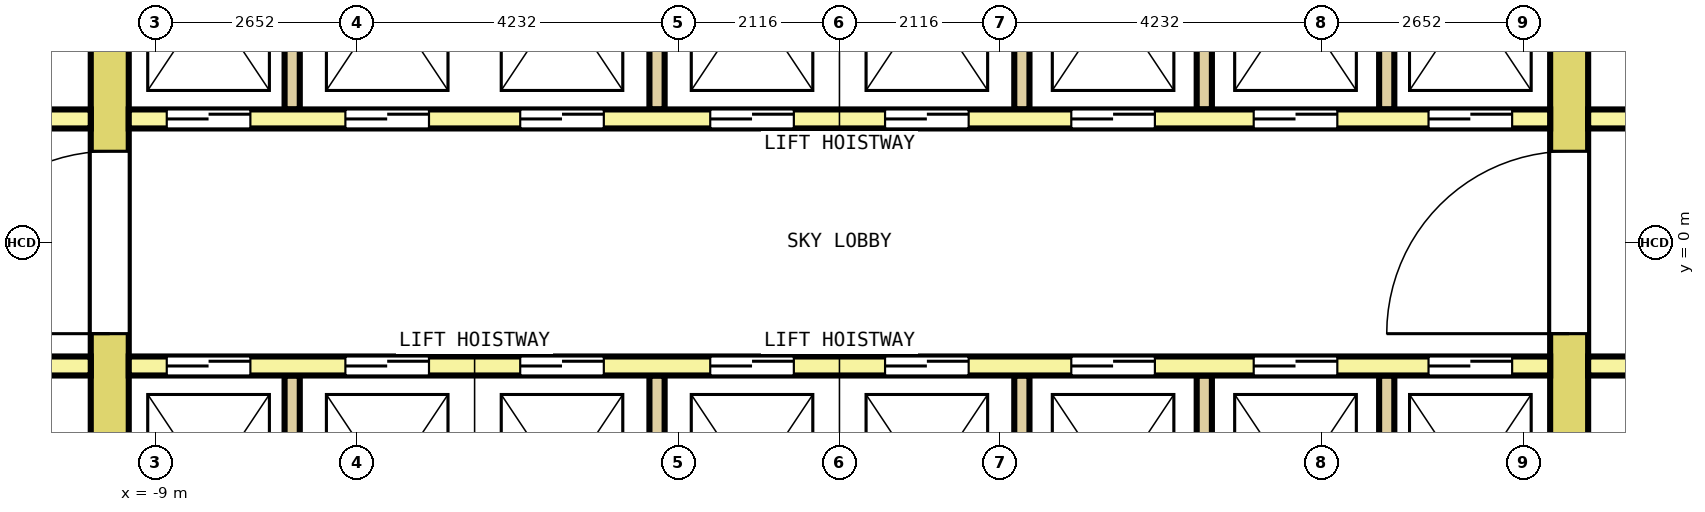
"""IFC4 building model, lengths in metres.
Left out: names, types, materials, properties, quantities, classifications, styles, units other than length and angle.
Written with IfcOpenShell. Run it as: python <this file> out.ifc"""

import sys

from ifc_helpers import new_model, si_unit, direction, frame, frame_2d, origin, place, context, subcontext, project, spatial, rectangle, extrude, element, fill, save


model = new_model("IFC4")
c1 = context("Model", 3, precision=1e-05, world=origin(), true_north=direction((0.0, 1.0)))
c2 = subcontext(c1, "Body", "Model", "MODEL_VIEW")
j1 = project(units=[si_unit("LENGTHUNIT", "METRE"), si_unit("PLANEANGLEUNIT", "RADIAN")], contexts=[c1])
p1 = place(None, origin())
s1 = spatial("IfcSite", under=j1, at=p1, CompositionType="ELEMENT")
p2 = place(p1, origin())
s2 = spatial("IfcBuilding", under=s1, at=p2, CompositionType="ELEMENT")
p3 = place(p2, frame((0.0, 0.0, 107.2)))
s3 = spatial("IfcBuildingStorey", under=s2, at=p3, CompositionType="ELEMENT", Elevation=107.2)
p4 = place(p3, frame((-9.6, -7.7, 0.0), z_axis=(0.0, 0.0, 1.0), x_axis=(0.0, 1.0, 0.0)))
e1 = element("IfcWall", 1, at=p4, inside=s3, PredefinedType="SHEAR", context=c2, shape_type="SweptSolid", body=[
    extrude(rectangle(XDim=15.4, YDim=0.5, at=frame_2d((7.7, 0.0))), origin(), (0.0, 0.0, 1.0), 5.7),
])
p5 = place(p4, frame((6.5, 0.0, 0.0)))
e2 = element("IfcOpeningElement", 2, at=p5, cuts=e1, PredefinedType="OPENING", context=c2, shape_type="SweptSolid", body=[
    extrude(rectangle(XDim=2.4, YDim=2.1, at=frame_2d((1.2, 1.05))), frame((0.0, 0.26, 0.0), z_axis=(0.0, -1.0, 0.0), x_axis=(1.0, 0.0, 0.0)), (0.0, 0.0, 1.0), 0.52),
])
p6 = place(p4, frame((13.4, 0.0, 0.0)))
e3 = element("IfcOpeningElement", 3, at=p6, cuts=e1, PredefinedType="OPENING", context=c2, shape_type="SweptSolid", body=[
    extrude(rectangle(XDim=1.2, YDim=2.1, at=frame_2d((0.6, 1.05))), frame((0.0, 0.26, 0.0), z_axis=(0.0, -1.0, 0.0), x_axis=(1.0, 0.0, 0.0)), (0.0, 0.0, 1.0), 0.52),
])
p7 = place(p4, frame((0.8, 0.0, 0.0)))
e4 = element("IfcOpeningElement", 4, at=p7, cuts=e1, PredefinedType="OPENING", context=c2, shape_type="SweptSolid", body=[
    extrude(rectangle(XDim=1.2, YDim=2.1, at=frame_2d((0.6, 1.05))), frame((0.0, 0.26, 0.0), z_axis=(0.0, -1.0, 0.0), x_axis=(1.0, 0.0, 0.0)), (0.0, 0.0, 1.0), 0.52),
])
p8 = place(p3, frame((9.6, -7.7, 0.0), z_axis=(0.0, 0.0, 1.0), x_axis=(0.0, 1.0, 0.0)))
e5 = element("IfcWall", 5, at=p8, inside=s3, PredefinedType="SHEAR", context=c2, shape_type="SweptSolid", body=[
    extrude(rectangle(XDim=15.4, YDim=0.5, at=frame_2d((7.7, 0.0))), origin(), (0.0, 0.0, 1.0), 5.7),
])
p9 = place(p8, frame((6.5, 0.0, 0.0)))
e6 = element("IfcOpeningElement", 6, at=p9, cuts=e5, PredefinedType="OPENING", context=c2, shape_type="SweptSolid", body=[
    extrude(rectangle(XDim=2.4, YDim=2.1, at=frame_2d((1.2, 1.05))), frame((0.0, 0.26, 0.0), z_axis=(0.0, -1.0, 0.0), x_axis=(1.0, 0.0, 0.0)), (0.0, 0.0, 1.0), 0.52),
])
p10 = place(p8, frame((13.4, 0.0, 0.0)))
e7 = element("IfcOpeningElement", 7, at=p10, cuts=e5, PredefinedType="OPENING", context=c2, shape_type="SweptSolid", body=[
    extrude(rectangle(XDim=1.2, YDim=2.1, at=frame_2d((0.6, 1.05))), frame((0.0, 0.26, 0.0), z_axis=(0.0, -1.0, 0.0), x_axis=(1.0, 0.0, 0.0)), (0.0, 0.0, 1.0), 0.52),
])
p11 = place(p8, frame((0.9, 0.0, 0.0)))
e8 = element("IfcOpeningElement", 8, at=p11, cuts=e5, PredefinedType="OPENING", context=c2, shape_type="SweptSolid", body=[
    extrude(rectangle(XDim=1.0, YDim=2.1, at=frame_2d((0.5, 1.05))), frame((0.0, 0.26, 0.0), z_axis=(0.0, -1.0, 0.0), x_axis=(1.0, 0.0, 0.0)), (0.0, 0.0, 1.0), 0.52),
])
p12 = place(p3, frame((-12.8, 1.625, 0.0), z_axis=(0.0, 0.0, 1.0), x_axis=(1.0, 0.0, 0.0)))
e9 = element("IfcWall", 9, at=p12, inside=s3, PredefinedType="SOLIDWALL", context=c2, shape_type="SweptSolid", body=[
    extrude(rectangle(XDim=2.95, YDim=0.25, at=frame_2d((1.475, 0.0))), origin(), (0.0, 0.0, 1.0), 5.7),
])
p13 = place(p12, frame((0.925, 0.0, 0.0)))
e10 = element("IfcOpeningElement", 10, at=p13, cuts=e9, PredefinedType="OPENING", context=c2, shape_type="SweptSolid", body=[
    extrude(rectangle(XDim=1.1, YDim=2.1, at=frame_2d((0.55, 1.05))), frame((0.0, 0.135, 0.0), z_axis=(0.0, -1.0, 0.0), x_axis=(1.0, 0.0, 0.0)), (0.0, 0.0, 1.0), 0.27),
])
p14 = place(p3, frame((-9.35, 1.625, 0.0), z_axis=(0.0, 0.0, 1.0), x_axis=(1.0, 0.0, 0.0)))
e11 = element("IfcWall", 11, at=p14, inside=s3, PredefinedType="SOLIDWALL", context=c2, shape_type="SweptSolid", body=[
    extrude(rectangle(XDim=18.7, YDim=0.25, at=frame_2d((9.35, 0.0))), origin(), (0.0, 0.0, 1.0), 5.7),
])
p15 = place(p14, frame((0.5, 0.0, 0.0)))
e12 = element("IfcOpeningElement", 12, at=p15, cuts=e11, PredefinedType="OPENING", context=c2, shape_type="SweptSolid", body=[
    extrude(rectangle(XDim=1.1, YDim=2.1, at=frame_2d((0.55, 1.05))), frame((0.0, 0.135, 0.0), z_axis=(0.0, -1.0, 0.0), x_axis=(1.0, 0.0, 0.0)), (0.0, 0.0, 1.0), 0.27),
])
p16 = place(p14, frame((2.85, 0.0, 0.0)))
e13 = element("IfcOpeningElement", 13, at=p16, cuts=e11, PredefinedType="OPENING", context=c2, shape_type="SweptSolid", body=[
    extrude(rectangle(XDim=1.1, YDim=2.1, at=frame_2d((0.55, 1.05))), frame((0.0, 0.135, 0.0), z_axis=(0.0, -1.0, 0.0), x_axis=(1.0, 0.0, 0.0)), (0.0, 0.0, 1.0), 0.27),
])
p17 = place(p14, frame((5.15, 0.0, 0.0)))
e14 = element("IfcOpeningElement", 14, at=p17, cuts=e11, PredefinedType="OPENING", context=c2, shape_type="SweptSolid", body=[
    extrude(rectangle(XDim=1.1, YDim=2.1, at=frame_2d((0.55, 1.05))), frame((0.0, 0.135, 0.0), z_axis=(0.0, -1.0, 0.0), x_axis=(1.0, 0.0, 0.0)), (0.0, 0.0, 1.0), 0.27),
])
p18 = place(p14, frame((7.65, 0.0, 0.0)))
e15 = element("IfcOpeningElement", 15, at=p18, cuts=e11, PredefinedType="OPENING", context=c2, shape_type="SweptSolid", body=[
    extrude(rectangle(XDim=1.1, YDim=2.1, at=frame_2d((0.55, 1.05))), frame((0.0, 0.135, 0.0), z_axis=(0.0, -1.0, 0.0), x_axis=(1.0, 0.0, 0.0)), (0.0, 0.0, 1.0), 0.27),
])
p19 = place(p14, frame((9.95, 0.0, 0.0)))
e16 = element("IfcOpeningElement", 16, at=p19, cuts=e11, PredefinedType="OPENING", context=c2, shape_type="SweptSolid", body=[
    extrude(rectangle(XDim=1.1, YDim=2.1, at=frame_2d((0.55, 1.05))), frame((0.0, 0.135, 0.0), z_axis=(0.0, -1.0, 0.0), x_axis=(1.0, 0.0, 0.0)), (0.0, 0.0, 1.0), 0.27),
])
p20 = place(p14, frame((12.4, 0.0, 0.0)))
e17 = element("IfcOpeningElement", 17, at=p20, cuts=e11, PredefinedType="OPENING", context=c2, shape_type="SweptSolid", body=[
    extrude(rectangle(XDim=1.1, YDim=2.1, at=frame_2d((0.55, 1.05))), frame((0.0, 0.135, 0.0), z_axis=(0.0, -1.0, 0.0), x_axis=(1.0, 0.0, 0.0)), (0.0, 0.0, 1.0), 0.27),
])
p21 = place(p14, frame((14.8, 0.0, 0.0)))
e18 = element("IfcOpeningElement", 18, at=p21, cuts=e11, PredefinedType="OPENING", context=c2, shape_type="SweptSolid", body=[
    extrude(rectangle(XDim=1.1, YDim=2.1, at=frame_2d((0.55, 1.05))), frame((0.0, 0.135, 0.0), z_axis=(0.0, -1.0, 0.0), x_axis=(1.0, 0.0, 0.0)), (0.0, 0.0, 1.0), 0.27),
])
p22 = place(p14, frame((17.1, 0.0, 0.0)))
e19 = element("IfcOpeningElement", 19, at=p22, cuts=e11, PredefinedType="OPENING", context=c2, shape_type="SweptSolid", body=[
    extrude(rectangle(XDim=1.1, YDim=2.1, at=frame_2d((0.55, 1.05))), frame((0.0, 0.135, 0.0), z_axis=(0.0, -1.0, 0.0), x_axis=(1.0, 0.0, 0.0)), (0.0, 0.0, 1.0), 0.27),
])
p23 = place(p3, frame((9.85, 1.625, 0.0), z_axis=(0.0, 0.0, 1.0), x_axis=(1.0, 0.0, 0.0)))
e20 = element("IfcWall", 20, at=p23, inside=s3, PredefinedType="SOLIDWALL", context=c2, shape_type="SweptSolid", body=[
    extrude(rectangle(XDim=2.95, YDim=0.25, at=frame_2d((1.475, 0.0))), origin(), (0.0, 0.0, 1.0), 5.7),
])
p24 = place(p23, frame((0.925, 0.0, 0.0)))
e21 = element("IfcOpeningElement", 21, at=p24, cuts=e20, PredefinedType="OPENING", context=c2, shape_type="SweptSolid", body=[
    extrude(rectangle(XDim=1.1, YDim=2.1, at=frame_2d((0.55, 1.05))), frame((0.0, 0.135, 0.0), z_axis=(0.0, -1.0, 0.0), x_axis=(1.0, 0.0, 0.0)), (0.0, 0.0, 1.0), 0.27),
])
for number, where, z_axis, x_axis in (
    (22, (-7.2, 1.75, 0.0), (0.0, 0.0, 1.0), (0.0, 1.0, 0.0)),
    (23, (-2.4, 1.75, 0.0), (0.0, 0.0, 1.0), (0.0, 1.0, 0.0)),
    (24, (2.4, 1.75, 0.0), (0.0, 0.0, 1.0), (0.0, 1.0, 0.0)),
    (25, (4.8, 1.75, 0.0), (0.0, 0.0, 1.0), (0.0, 1.0, 0.0)),
    (26, (7.2, 1.75, 0.0), (0.0, 0.0, 1.0), (0.0, 1.0, 0.0)),
):
    element("IfcWall", number, at=place(p3, frame(where, z_axis=z_axis, x_axis=x_axis)), inside=s3, PredefinedType="SOLIDWALL", context=c2, shape_type="SweptSolid", body=[
        extrude(rectangle(XDim=2.9, YDim=0.2, at=frame_2d((1.45, 0.0))), origin(), (0.0, 0.0, 1.0), 5.7),
    ])
p25 = place(p3, frame((-12.8, -1.625, 0.0), z_axis=(0.0, 0.0, 1.0), x_axis=(1.0, 0.0, 0.0)))
e27 = element("IfcWall", 27, at=p25, inside=s3, PredefinedType="SOLIDWALL", context=c2, shape_type="SweptSolid", body=[
    extrude(rectangle(XDim=2.95, YDim=0.25, at=frame_2d((1.475, 0.0))), origin(), (0.0, 0.0, 1.0), 5.7),
])
p26 = place(p25, frame((0.925, 0.0, 0.0)))
e28 = element("IfcOpeningElement", 28, at=p26, cuts=e27, PredefinedType="OPENING", context=c2, shape_type="SweptSolid", body=[
    extrude(rectangle(XDim=1.1, YDim=2.1, at=frame_2d((0.55, 1.05))), frame((0.0, 0.135, 0.0), z_axis=(0.0, -1.0, 0.0), x_axis=(1.0, 0.0, 0.0)), (0.0, 0.0, 1.0), 0.27),
])
p27 = place(p3, frame((-9.35, -1.625, 0.0), z_axis=(0.0, 0.0, 1.0), x_axis=(1.0, 0.0, 0.0)))
e29 = element("IfcWall", 29, at=p27, inside=s3, PredefinedType="SOLIDWALL", context=c2, shape_type="SweptSolid", body=[
    extrude(rectangle(XDim=18.7, YDim=0.25, at=frame_2d((9.35, 0.0))), origin(), (0.0, 0.0, 1.0), 5.7),
])
p28 = place(p27, frame((0.5, 0.0, 0.0)))
e30 = element("IfcOpeningElement", 30, at=p28, cuts=e29, PredefinedType="OPENING", context=c2, shape_type="SweptSolid", body=[
    extrude(rectangle(XDim=1.1, YDim=2.1, at=frame_2d((0.55, 1.05))), frame((0.0, 0.135, 0.0), z_axis=(0.0, -1.0, 0.0), x_axis=(1.0, 0.0, 0.0)), (0.0, 0.0, 1.0), 0.27),
])
p29 = place(p27, frame((2.85, 0.0, 0.0)))
e31 = element("IfcOpeningElement", 31, at=p29, cuts=e29, PredefinedType="OPENING", context=c2, shape_type="SweptSolid", body=[
    extrude(rectangle(XDim=1.1, YDim=2.1, at=frame_2d((0.55, 1.05))), frame((0.0, 0.135, 0.0), z_axis=(0.0, -1.0, 0.0), x_axis=(1.0, 0.0, 0.0)), (0.0, 0.0, 1.0), 0.27),
])
p30 = place(p27, frame((5.15, 0.0, 0.0)))
e32 = element("IfcOpeningElement", 32, at=p30, cuts=e29, PredefinedType="OPENING", context=c2, shape_type="SweptSolid", body=[
    extrude(rectangle(XDim=1.1, YDim=2.1, at=frame_2d((0.55, 1.05))), frame((0.0, 0.135, 0.0), z_axis=(0.0, -1.0, 0.0), x_axis=(1.0, 0.0, 0.0)), (0.0, 0.0, 1.0), 0.27),
])
p31 = place(p27, frame((7.65, 0.0, 0.0)))
e33 = element("IfcOpeningElement", 33, at=p31, cuts=e29, PredefinedType="OPENING", context=c2, shape_type="SweptSolid", body=[
    extrude(rectangle(XDim=1.1, YDim=2.1, at=frame_2d((0.55, 1.05))), frame((0.0, 0.135, 0.0), z_axis=(0.0, -1.0, 0.0), x_axis=(1.0, 0.0, 0.0)), (0.0, 0.0, 1.0), 0.27),
])
p32 = place(p27, frame((9.95, 0.0, 0.0)))
e34 = element("IfcOpeningElement", 34, at=p32, cuts=e29, PredefinedType="OPENING", context=c2, shape_type="SweptSolid", body=[
    extrude(rectangle(XDim=1.1, YDim=2.1, at=frame_2d((0.55, 1.05))), frame((0.0, 0.135, 0.0), z_axis=(0.0, -1.0, 0.0), x_axis=(1.0, 0.0, 0.0)), (0.0, 0.0, 1.0), 0.27),
])
p33 = place(p27, frame((12.4, 0.0, 0.0)))
e35 = element("IfcOpeningElement", 35, at=p33, cuts=e29, PredefinedType="OPENING", context=c2, shape_type="SweptSolid", body=[
    extrude(rectangle(XDim=1.1, YDim=2.1, at=frame_2d((0.55, 1.05))), frame((0.0, 0.135, 0.0), z_axis=(0.0, -1.0, 0.0), x_axis=(1.0, 0.0, 0.0)), (0.0, 0.0, 1.0), 0.27),
])
p34 = place(p27, frame((14.8, 0.0, 0.0)))
e36 = element("IfcOpeningElement", 36, at=p34, cuts=e29, PredefinedType="OPENING", context=c2, shape_type="SweptSolid", body=[
    extrude(rectangle(XDim=1.1, YDim=2.1, at=frame_2d((0.55, 1.05))), frame((0.0, 0.135, 0.0), z_axis=(0.0, -1.0, 0.0), x_axis=(1.0, 0.0, 0.0)), (0.0, 0.0, 1.0), 0.27),
])
p35 = place(p27, frame((17.1, 0.0, 0.0)))
e37 = element("IfcOpeningElement", 37, at=p35, cuts=e29, PredefinedType="OPENING", context=c2, shape_type="SweptSolid", body=[
    extrude(rectangle(XDim=1.1, YDim=2.1, at=frame_2d((0.55, 1.05))), frame((0.0, 0.135, 0.0), z_axis=(0.0, -1.0, 0.0), x_axis=(1.0, 0.0, 0.0)), (0.0, 0.0, 1.0), 0.27),
])
p36 = place(p3, frame((9.85, -1.625, 0.0), z_axis=(0.0, 0.0, 1.0), x_axis=(1.0, 0.0, 0.0)))
e38 = element("IfcWall", 38, at=p36, inside=s3, PredefinedType="SOLIDWALL", context=c2, shape_type="SweptSolid", body=[
    extrude(rectangle(XDim=2.95, YDim=0.25, at=frame_2d((1.475, 0.0))), origin(), (0.0, 0.0, 1.0), 5.7),
])
p37 = place(p36, frame((0.925, 0.0, 0.0)))
e39 = element("IfcOpeningElement", 39, at=p37, cuts=e38, PredefinedType="OPENING", context=c2, shape_type="SweptSolid", body=[
    extrude(rectangle(XDim=1.1, YDim=2.1, at=frame_2d((0.55, 1.05))), frame((0.0, 0.135, 0.0), z_axis=(0.0, -1.0, 0.0), x_axis=(1.0, 0.0, 0.0)), (0.0, 0.0, 1.0), 0.27),
])
for number, where, z_axis, x_axis in (
    (40, (-7.2, -4.65, 0.0), (0.0, 0.0, 1.0), (0.0, 1.0, 0.0)),
    (41, (-2.4, -4.65, 0.0), (0.0, 0.0, 1.0), (0.0, 1.0, 0.0)),
    (42, (2.4, -4.65, 0.0), (0.0, 0.0, 1.0), (0.0, 1.0, 0.0)),
    (43, (4.8, -4.65, 0.0), (0.0, 0.0, 1.0), (0.0, 1.0, 0.0)),
    (44, (7.2, -4.65, 0.0), (0.0, 0.0, 1.0), (0.0, 1.0, 0.0)),
):
    element("IfcWall", number, at=place(p3, frame(where, z_axis=z_axis, x_axis=x_axis)), inside=s3, PredefinedType="SOLIDWALL", context=c2, shape_type="SweptSolid", body=[
        extrude(rectangle(XDim=2.9, YDim=0.2, at=frame_2d((1.45, 0.0))), origin(), (0.0, 0.0, 1.0), 5.7),
    ])
p38 = place(p15, origin())
e45 = element("IfcDoor", 45, at=p38, inside=s3, OperationType="DOUBLE_DOOR_SLIDING", PredefinedType="DOOR", context=c2, shape_type="SweptSolid", body=[
    extrude(rectangle(XDim=1.1, YDim=2.1, at=frame_2d((0.55, 1.05))), frame((0.0, 0.075, 0.0), z_axis=(0.0, -1.0, 0.0), x_axis=(1.0, 0.0, 0.0)), (0.0, 0.0, 1.0), 0.15),
])
fill(e12, e45)
p39 = place(p16, origin())
e46 = element("IfcDoor", 46, at=p39, inside=s3, OperationType="DOUBLE_DOOR_SLIDING", PredefinedType="DOOR", context=c2, shape_type="SweptSolid", body=[
    extrude(rectangle(XDim=1.1, YDim=2.1, at=frame_2d((0.55, 1.05))), frame((0.0, 0.075, 0.0), z_axis=(0.0, -1.0, 0.0), x_axis=(1.0, 0.0, 0.0)), (0.0, 0.0, 1.0), 0.15),
])
fill(e13, e46)
p40 = place(p17, origin())
e47 = element("IfcDoor", 47, at=p40, inside=s3, OperationType="DOUBLE_DOOR_SLIDING", PredefinedType="DOOR", context=c2, shape_type="SweptSolid", body=[
    extrude(rectangle(XDim=1.1, YDim=2.1, at=frame_2d((0.55, 1.05))), frame((0.0, 0.075, 0.0), z_axis=(0.0, -1.0, 0.0), x_axis=(1.0, 0.0, 0.0)), (0.0, 0.0, 1.0), 0.15),
])
fill(e14, e47)
p41 = place(p18, origin())
e48 = element("IfcDoor", 48, at=p41, inside=s3, OperationType="DOUBLE_DOOR_SLIDING", PredefinedType="DOOR", context=c2, shape_type="SweptSolid", body=[
    extrude(rectangle(XDim=1.1, YDim=2.1, at=frame_2d((0.55, 1.05))), frame((0.0, 0.075, 0.0), z_axis=(0.0, -1.0, 0.0), x_axis=(1.0, 0.0, 0.0)), (0.0, 0.0, 1.0), 0.15),
])
fill(e15, e48)
p42 = place(p19, origin())
e49 = element("IfcDoor", 49, at=p42, inside=s3, OperationType="DOUBLE_DOOR_SLIDING", PredefinedType="DOOR", context=c2, shape_type="SweptSolid", body=[
    extrude(rectangle(XDim=1.1, YDim=2.1, at=frame_2d((0.55, 1.05))), frame((0.0, 0.075, 0.0), z_axis=(0.0, -1.0, 0.0), x_axis=(1.0, 0.0, 0.0)), (0.0, 0.0, 1.0), 0.15),
])
fill(e16, e49)
p43 = place(p20, origin())
e50 = element("IfcDoor", 50, at=p43, inside=s3, OperationType="DOUBLE_DOOR_SLIDING", PredefinedType="DOOR", context=c2, shape_type="SweptSolid", body=[
    extrude(rectangle(XDim=1.1, YDim=2.1, at=frame_2d((0.55, 1.05))), frame((0.0, 0.075, 0.0), z_axis=(0.0, -1.0, 0.0), x_axis=(1.0, 0.0, 0.0)), (0.0, 0.0, 1.0), 0.15),
])
fill(e17, e50)
p44 = place(p21, origin())
e51 = element("IfcDoor", 51, at=p44, inside=s3, OperationType="DOUBLE_DOOR_SLIDING", PredefinedType="DOOR", context=c2, shape_type="SweptSolid", body=[
    extrude(rectangle(XDim=1.1, YDim=2.1, at=frame_2d((0.55, 1.05))), frame((0.0, 0.075, 0.0), z_axis=(0.0, -1.0, 0.0), x_axis=(1.0, 0.0, 0.0)), (0.0, 0.0, 1.0), 0.15),
])
fill(e18, e51)
p45 = place(p22, origin())
e52 = element("IfcDoor", 52, at=p45, inside=s3, OperationType="DOUBLE_DOOR_SLIDING", PredefinedType="DOOR", context=c2, shape_type="SweptSolid", body=[
    extrude(rectangle(XDim=1.1, YDim=2.1, at=frame_2d((0.55, 1.05))), frame((0.0, 0.075, 0.0), z_axis=(0.0, -1.0, 0.0), x_axis=(1.0, 0.0, 0.0)), (0.0, 0.0, 1.0), 0.15),
])
fill(e19, e52)
p46 = place(p28, origin())
e53 = element("IfcDoor", 53, at=p46, inside=s3, OperationType="DOUBLE_DOOR_SLIDING", PredefinedType="DOOR", context=c2, shape_type="SweptSolid", body=[
    extrude(rectangle(XDim=1.1, YDim=2.1, at=frame_2d((0.55, 1.05))), frame((0.0, 0.075, 0.0), z_axis=(0.0, -1.0, 0.0), x_axis=(1.0, 0.0, 0.0)), (0.0, 0.0, 1.0), 0.15),
])
fill(e30, e53)
p47 = place(p29, origin())
e54 = element("IfcDoor", 54, at=p47, inside=s3, OperationType="DOUBLE_DOOR_SLIDING", PredefinedType="DOOR", context=c2, shape_type="SweptSolid", body=[
    extrude(rectangle(XDim=1.1, YDim=2.1, at=frame_2d((0.55, 1.05))), frame((0.0, 0.075, 0.0), z_axis=(0.0, -1.0, 0.0), x_axis=(1.0, 0.0, 0.0)), (0.0, 0.0, 1.0), 0.15),
])
fill(e31, e54)
p48 = place(p30, origin())
e55 = element("IfcDoor", 55, at=p48, inside=s3, OperationType="DOUBLE_DOOR_SLIDING", PredefinedType="DOOR", context=c2, shape_type="SweptSolid", body=[
    extrude(rectangle(XDim=1.1, YDim=2.1, at=frame_2d((0.55, 1.05))), frame((0.0, 0.075, 0.0), z_axis=(0.0, -1.0, 0.0), x_axis=(1.0, 0.0, 0.0)), (0.0, 0.0, 1.0), 0.15),
])
fill(e32, e55)
p49 = place(p31, origin())
e56 = element("IfcDoor", 56, at=p49, inside=s3, OperationType="DOUBLE_DOOR_SLIDING", PredefinedType="DOOR", context=c2, shape_type="SweptSolid", body=[
    extrude(rectangle(XDim=1.1, YDim=2.1, at=frame_2d((0.55, 1.05))), frame((0.0, 0.075, 0.0), z_axis=(0.0, -1.0, 0.0), x_axis=(1.0, 0.0, 0.0)), (0.0, 0.0, 1.0), 0.15),
])
fill(e33, e56)
p50 = place(p32, origin())
e57 = element("IfcDoor", 57, at=p50, inside=s3, OperationType="DOUBLE_DOOR_SLIDING", PredefinedType="DOOR", context=c2, shape_type="SweptSolid", body=[
    extrude(rectangle(XDim=1.1, YDim=2.1, at=frame_2d((0.55, 1.05))), frame((0.0, 0.075, 0.0), z_axis=(0.0, -1.0, 0.0), x_axis=(1.0, 0.0, 0.0)), (0.0, 0.0, 1.0), 0.15),
])
fill(e34, e57)
p51 = place(p33, origin())
e58 = element("IfcDoor", 58, at=p51, inside=s3, OperationType="DOUBLE_DOOR_SLIDING", PredefinedType="DOOR", context=c2, shape_type="SweptSolid", body=[
    extrude(rectangle(XDim=1.1, YDim=2.1, at=frame_2d((0.55, 1.05))), frame((0.0, 0.075, 0.0), z_axis=(0.0, -1.0, 0.0), x_axis=(1.0, 0.0, 0.0)), (0.0, 0.0, 1.0), 0.15),
])
fill(e35, e58)
p52 = place(p34, origin())
e59 = element("IfcDoor", 59, at=p52, inside=s3, OperationType="DOUBLE_DOOR_SLIDING", PredefinedType="DOOR", context=c2, shape_type="SweptSolid", body=[
    extrude(rectangle(XDim=1.1, YDim=2.1, at=frame_2d((0.55, 1.05))), frame((0.0, 0.075, 0.0), z_axis=(0.0, -1.0, 0.0), x_axis=(1.0, 0.0, 0.0)), (0.0, 0.0, 1.0), 0.15),
])
fill(e36, e59)
p53 = place(p35, origin())
e60 = element("IfcDoor", 60, at=p53, inside=s3, OperationType="DOUBLE_DOOR_SLIDING", PredefinedType="DOOR", context=c2, shape_type="SweptSolid", body=[
    extrude(rectangle(XDim=1.1, YDim=2.1, at=frame_2d((0.55, 1.05))), frame((0.0, 0.075, 0.0), z_axis=(0.0, -1.0, 0.0), x_axis=(1.0, 0.0, 0.0)), (0.0, 0.0, 1.0), 0.15),
])
fill(e37, e60)
p54 = place(p5, origin())
e61 = element("IfcDoor", 61, at=p54, inside=s3, OperationType="DOUBLE_DOOR_SINGLE_SWING", PredefinedType="DOOR", context=c2, shape_type="SweptSolid", body=[
    extrude(rectangle(XDim=2.4, YDim=2.1, at=frame_2d((1.2, 1.05))), frame((0.0, 0.2, 0.0), z_axis=(0.0, -1.0, 0.0), x_axis=(1.0, 0.0, 0.0)), (0.0, 0.0, 1.0), 0.4),
])
fill(e2, e61)
p55 = place(p9, origin())
e62 = element("IfcDoor", 62, at=p55, inside=s3, OperationType="DOUBLE_DOOR_SINGLE_SWING", PredefinedType="DOOR", context=c2, shape_type="SweptSolid", body=[
    extrude(rectangle(XDim=2.4, YDim=2.1, at=frame_2d((1.2, 1.05))), frame((0.0, 0.2, 0.0), z_axis=(0.0, -1.0, 0.0), x_axis=(1.0, 0.0, 0.0)), (0.0, 0.0, 1.0), 0.4),
])
fill(e6, e62)
save(model, sys.argv[1])
